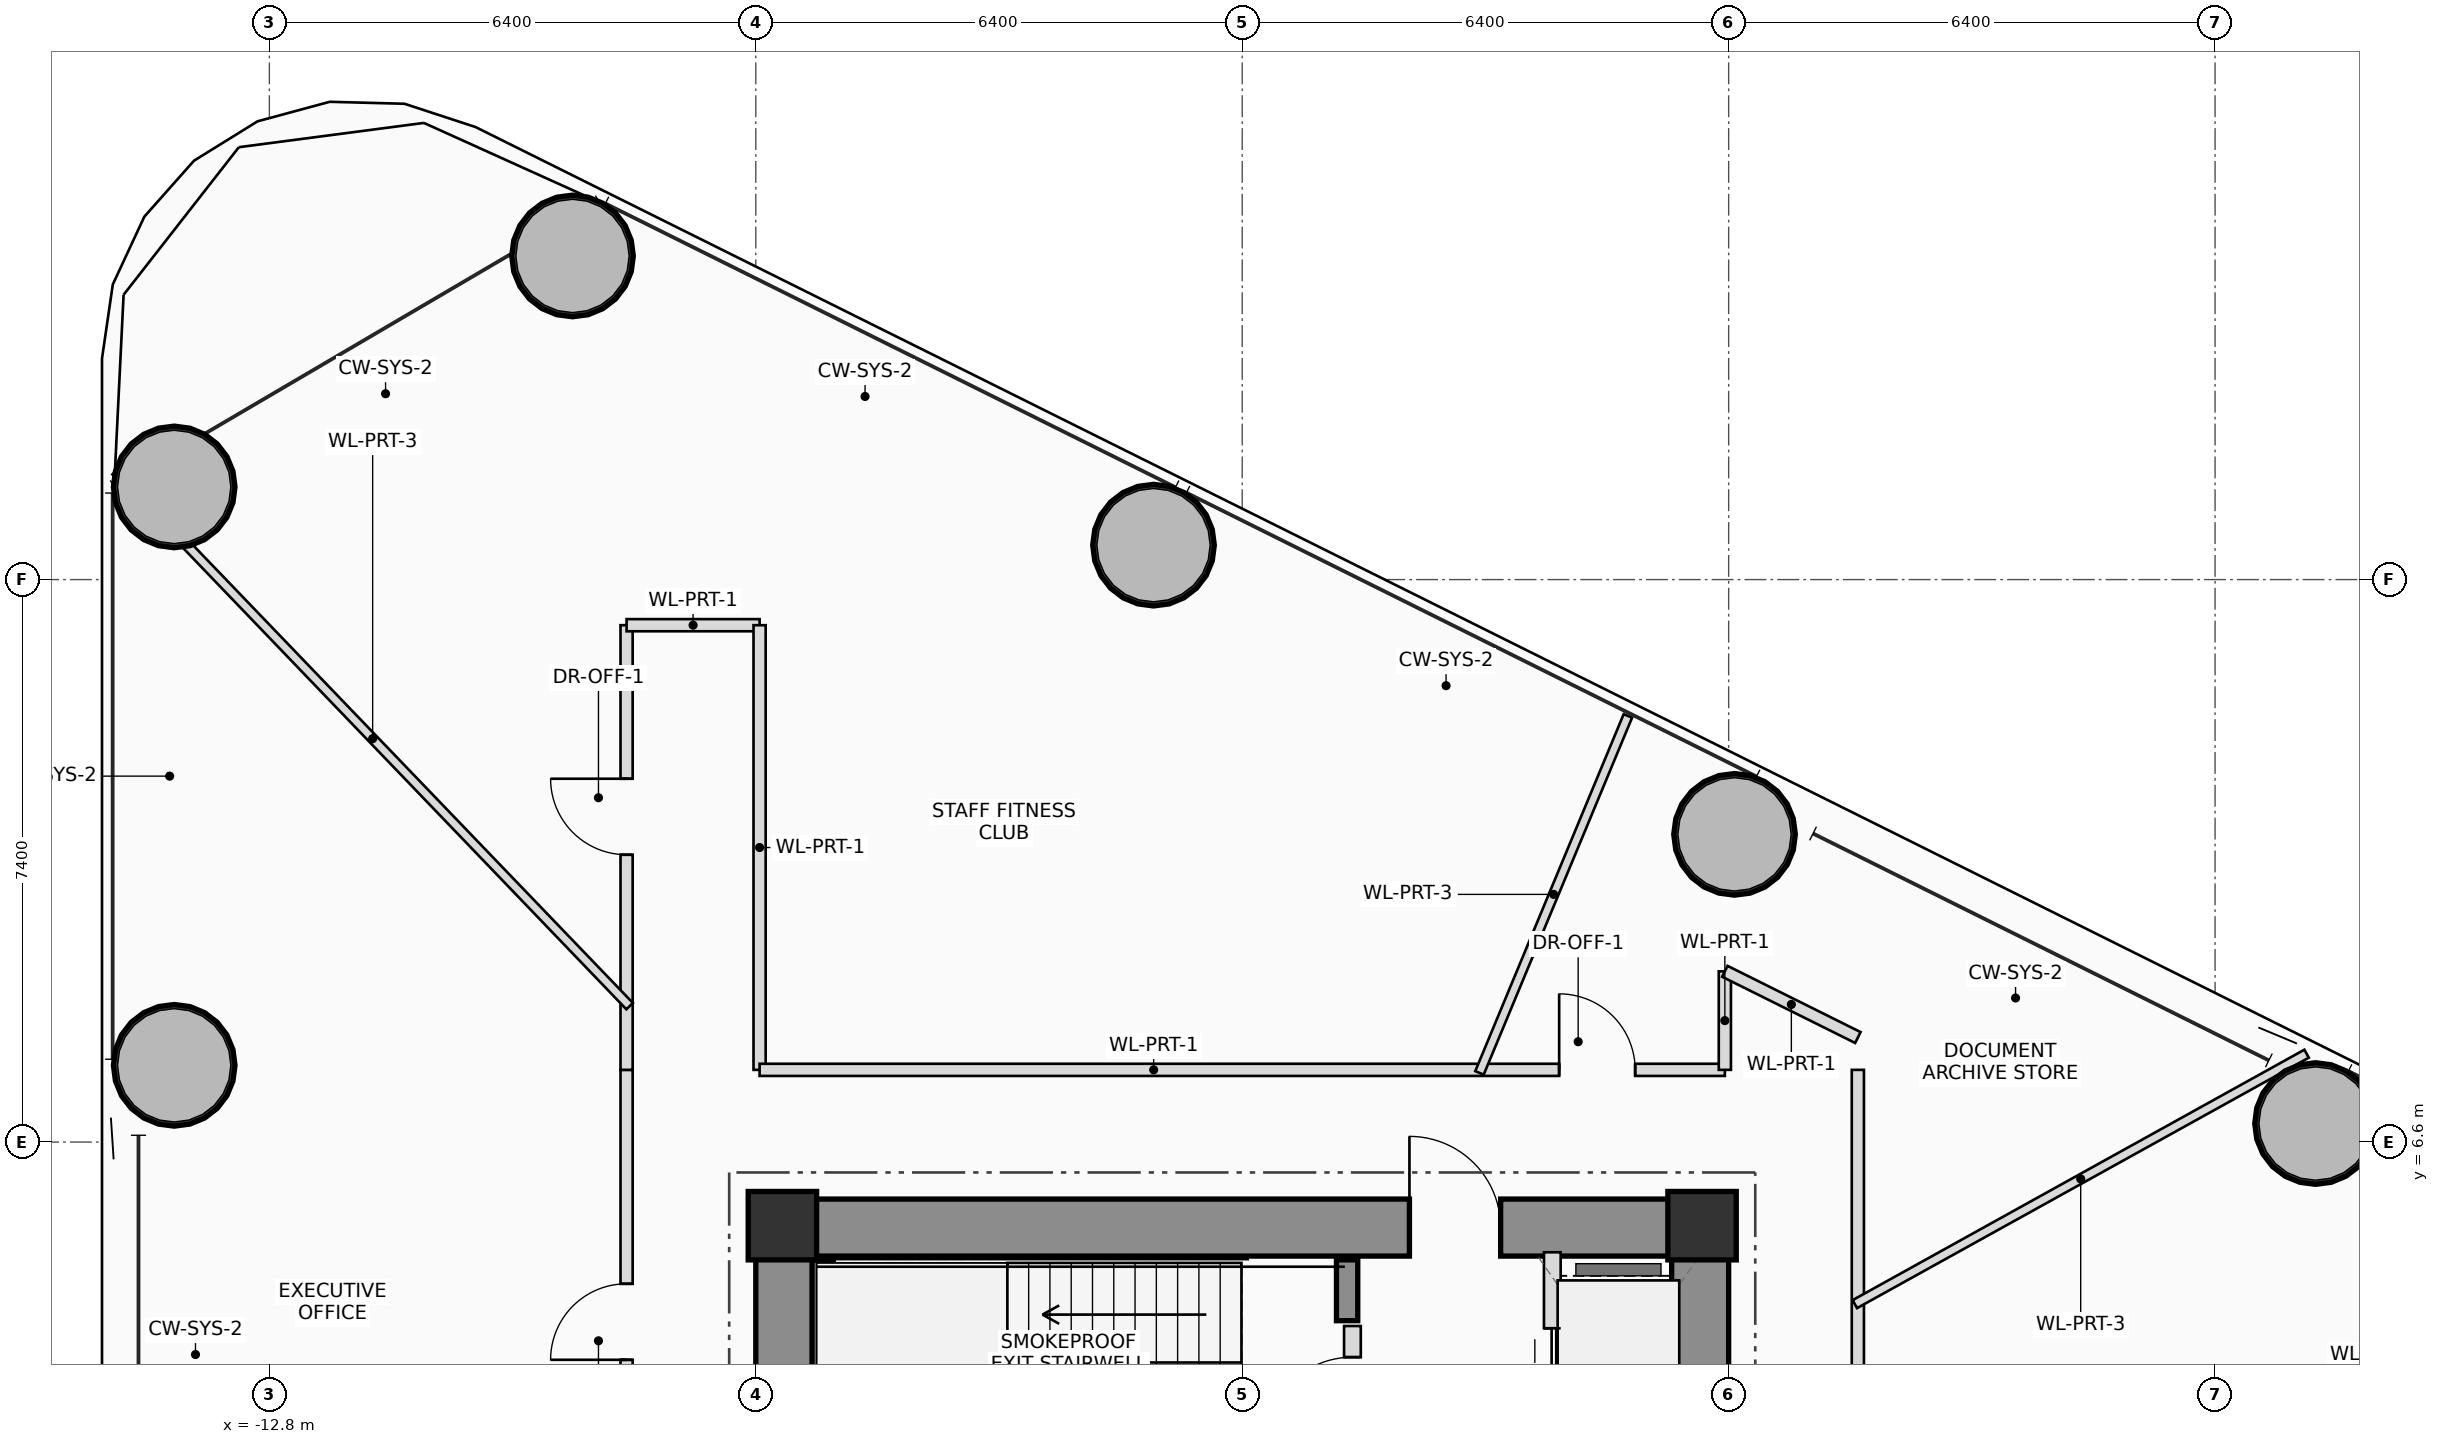
"""IFC4 building model, lengths in metres.
Left out: names, types, materials, properties, quantities, classifications, styles, units other than length and angle.
Written with IfcOpenShell. Run it as: python <this file> out.ifc"""

import sys

from ifc_helpers import new_model, si_unit, direction, frame, frame_2d, origin, origin_2d, place, context, subcontext, project, spatial, rectangle, hollow_circle, extrude, source, transform, mapped, element, fill, save


model = new_model("IFC4")
c1 = context("Model", 3, precision=1e-05, world=origin(), true_north=direction((0.0, 1.0)))
c2 = subcontext(c1, "Body", "Model", "MODEL_VIEW")
j1 = project(units=[si_unit("LENGTHUNIT", "METRE"), si_unit("PLANEANGLEUNIT", "RADIAN")], contexts=[c1])
p1 = place(None, origin())
s1 = spatial("IfcSite", under=j1, at=p1, CompositionType="ELEMENT")
p2 = place(p1, origin())
s2 = spatial("IfcBuilding", under=s1, at=p2, CompositionType="ELEMENT")
p3 = place(p2, frame((0.0, 0.0, 31.2)))
s3 = spatial("IfcBuildingStorey", under=s2, at=p3, CompositionType="ELEMENT", Elevation=31.2)
m1 = source(origin(), c2, "Body", "SweptSolid", [
    extrude(rectangle(XDim=0.9, YDim=0.9, at=origin_2d()), origin(), (0.0, 0.0, 1.0), 3.7),
])
for number, where, z_axis, x_axis in (
    (1, (6.05, 5.5, 0.0), (0.0, 0.0, 1.0), (1.0, 0.0, 0.0)),
    (2, (-6.05, 5.5, 0.0), (0.0, 0.0, 1.0), (1.0, 0.0, 0.0)),
):
    element("IfcColumn", number, at=place(p3, frame(where, z_axis=z_axis, x_axis=x_axis)), inside=s3, PredefinedType="COLUMN", context=c2, shape_type="MappedRepresentation", body=[
        mapped(m1, transform((0.0, 0.0, 0.0), scale=1.0)),
    ])
p4 = place(p3, frame((-6.4, 5.475, 0.0), z_axis=(0.0, 0.0, 1.0), x_axis=(1.0, 0.0, 0.0)))
e3 = element("IfcWall", 3, at=p4, inside=s3, PredefinedType="SHEAR", context=c2, shape_type="SweptSolid", body=[
    extrude(rectangle(XDim=12.8, YDim=0.75, at=frame_2d((6.4, 0.0))), origin(), (0.0, 0.0, 1.0), 3.7),
])
p5 = place(p4, frame((8.6, 0.0, 0.0)))
e4 = element("IfcOpeningElement", 4, at=p5, cuts=e3, PredefinedType="OPENING", context=c2, shape_type="SweptSolid", body=[
    extrude(rectangle(XDim=1.2, YDim=2.2, at=frame_2d((0.6, 1.1))), frame((0.0, 0.385, 0.0), z_axis=(0.0, -1.0, 0.0), x_axis=(1.0, 0.0, 0.0)), (0.0, 0.0, 1.0), 0.77),
])
p6 = place(p3, frame((6.025, -5.1, 0.0), z_axis=(0.0, 0.0, 1.0), x_axis=(0.0, 1.0, 0.0)))
e5 = element("IfcWall", 5, at=p6, inside=s3, PredefinedType="SHEAR", context=c2, shape_type="SweptSolid", body=[
    extrude(rectangle(XDim=10.2, YDim=0.75, at=frame_2d((5.1, 0.0))), origin(), (0.0, 0.0, 1.0), 3.7),
])
p7 = place(p3, frame((-6.025, 1.75, 0.0), z_axis=(0.0, 0.0, 1.0), x_axis=(0.0, 1.0, 0.0)))
e6 = element("IfcWall", 6, at=p7, inside=s3, PredefinedType="SHEAR", context=c2, shape_type="SweptSolid", body=[
    extrude(rectangle(XDim=3.35, YDim=0.75, at=frame_2d((1.675, 0.0))), origin(), (0.0, 0.0, 1.0), 3.7),
])
p8 = place(p3, frame((-5.52, 2.3, 0.0), z_axis=(0.0, 0.0, 1.0), x_axis=(0.0, 1.0, 0.0)))
e7 = element("IfcWall", 7, at=p8, inside=s3, PredefinedType="SHEAR", context=c2, shape_type="SweptSolid", body=[
    extrude(rectangle(XDim=2.75, YDim=0.28, at=frame_2d((1.375, 0.0))), origin(), (0.0, 0.0, 1.0), 3.7),
])
p9 = place(p3, frame((1.38, 4.25, 0.0), z_axis=(0.0, 0.0, 1.0), x_axis=(0.0, 1.0, 0.0)))
e8 = element("IfcWall", 8, at=p9, inside=s3, PredefinedType="SHEAR", context=c2, shape_type="SweptSolid", body=[
    extrude(rectangle(XDim=0.8, YDim=0.28, at=frame_2d((0.4, 0.0))), origin(), (0.0, 0.0, 1.0), 3.7),
])
m2 = source(origin(), c2, "Body", "SweptSolid", [
    extrude(hollow_circle(Radius=0.8, WallThickness=0.055, at=origin_2d()), origin(), (0.0, 0.0, 1.0), 3.7),
])
for number, where, z_axis, x_axis in (
    (9, (14.122, 6.844, 0.0), (0.0, 0.0, 1.0), (1.0, 0.0, 0.0)),
    (10, (6.477, 10.648, 0.0), (0.0, 0.0, 1.0), (1.0, 0.0, 0.0)),
    (11, (-1.167, 14.453, 0.0), (0.0, 0.0, 1.0), (1.0, 0.0, 0.0)),
    (12, (-8.812, 18.258, 0.0), (0.0, 0.0, 1.0), (1.0, 0.0, 0.0)),
    (13, (-14.052, 15.219, 0.0), (0.0, 0.0, 1.0), (1.0, 0.0, 0.0)),
    (14, (-14.052, 7.61, 0.0), (0.0, 0.0, 1.0), (1.0, 0.0, 0.0)),
):
    element("IfcColumn", number, at=place(p3, frame(where, z_axis=z_axis, x_axis=x_axis)), inside=s3, PredefinedType="COLUMN", context=c2, shape_type="MappedRepresentation", body=[
        mapped(m2, transform((0.0, 0.0, 0.0), scale=1.0)),
    ])
p10 = place(p3, frame((1.45, 2.2, 0.0), z_axis=(0.0, 0.0, 1.0), x_axis=(0.0, 1.0, 0.0)))
e15 = element("IfcWall", 15, at=p10, inside=s3, PredefinedType="PLUMBINGWALL", context=c2, shape_type="SweptSolid", body=[
    extrude(rectangle(XDim=1.98, YDim=0.22, at=frame_2d((0.99, 0.0))), origin(), (0.0, 0.0, 1.0), 3.495),
])
p11 = place(p10, frame((0.42, 0.0, 0.0)))
e16 = element("IfcOpeningElement", 16, at=p11, cuts=e15, PredefinedType="OPENING", context=c2, shape_type="SweptSolid", body=[
    extrude(rectangle(XDim=1.15, YDim=2.15, at=frame_2d((0.575, 1.075))), frame((0.0, 0.12, 0.0), z_axis=(0.0, -1.0, 0.0), x_axis=(1.0, 0.0, 0.0)), (0.0, 0.0, 1.0), 0.24),
])
p12 = place(p3, frame((4.08, 2.2, 0.0), z_axis=(0.0, 0.0, 1.0), x_axis=(0.0, 1.0, 0.0)))
e17 = element("IfcWall", 17, at=p12, inside=s3, PredefinedType="PLUMBINGWALL", context=c2, shape_type="SweptSolid", body=[
    extrude(rectangle(XDim=2.95, YDim=0.22, at=frame_2d((1.475, 0.0))), origin(), (0.0, 0.0, 1.0), 3.495),
])
p13 = place(p12, frame((0.75, 0.0, 0.0)))
e18 = element("IfcOpeningElement", 18, at=p13, cuts=e17, PredefinedType="OPENING", context=c2, shape_type="SweptSolid", body=[
    extrude(rectangle(XDim=1.2, YDim=2.25, at=frame_2d((0.6, 1.125))), frame((0.0, 0.12, 0.0), z_axis=(0.0, -1.0, 0.0), x_axis=(1.0, 0.0, 0.0)), (0.0, 0.0, 1.0), 0.24),
])
p14 = place(p3, frame((-8.1, -7.55, 0.0), z_axis=(0.0, 0.0, 1.0), x_axis=(0.0, 1.0, 0.0)))
e19 = element("IfcWall", 19, at=p14, inside=s3, PredefinedType="PARTITIONING", context=c2, shape_type="SweptSolid", body=[
    extrude(rectangle(XDim=15.1, YDim=0.16, at=frame_2d((7.55, 0.0))), origin(), (0.0, 0.0, 1.0), 2.8),
])
p15 = place(p14, frame((11.285, 0.0, 0.0)))
e20 = element("IfcOpeningElement", 20, at=p15, cuts=e19, PredefinedType="OPENING", context=c2, shape_type="SweptSolid", body=[
    extrude(rectangle(XDim=1.0, YDim=2.25, at=frame_2d((0.5, 1.125))), frame((0.0, 0.09, 0.0), z_axis=(0.0, -1.0, 0.0), x_axis=(1.0, 0.0, 0.0)), (0.0, 0.0, 1.0), 0.18),
])
p16 = place(p3, frame((-8.1, 7.55, 0.0), z_axis=(0.0, 0.0, 1.0), x_axis=(0.0, 1.0, 0.0)))
e21 = element("IfcWall", 21, at=p16, inside=s3, PredefinedType="PARTITIONING", context=c2, shape_type="SweptSolid", body=[
    extrude(rectangle(XDim=5.85, YDim=0.16, at=frame_2d((2.925, 0.0))), origin(), (0.0, 0.0, 1.0), 2.8),
])
p17 = place(p16, frame((2.83, 0.0, 0.0)))
e22 = element("IfcOpeningElement", 22, at=p17, cuts=e21, PredefinedType="OPENING", context=c2, shape_type="SweptSolid", body=[
    extrude(rectangle(XDim=1.0, YDim=2.25, at=frame_2d((0.5, 1.125))), frame((0.0, 0.09, 0.0), z_axis=(0.0, -1.0, 0.0), x_axis=(1.0, 0.0, 0.0)), (0.0, 0.0, 1.0), 0.18),
])
p18 = place(p3, frame((-8.1, 13.4, 0.0), z_axis=(0.0, 0.0, 1.0), x_axis=(1.0, 0.0, 0.0)))
e23 = element("IfcWall", 23, at=p18, inside=s3, PredefinedType="PARTITIONING", context=c2, shape_type="SweptSolid", body=[
    extrude(rectangle(XDim=1.75, YDim=0.16, at=frame_2d((0.875, 0.0))), origin(), (0.0, 0.0, 1.0), 2.8),
])
p19 = place(p3, frame((-6.35, 13.4, 0.0), z_axis=(0.0, 0.0, 1.0), x_axis=(0.0, -1.0, 0.0)))
e24 = element("IfcWall", 24, at=p19, inside=s3, PredefinedType="PARTITIONING", context=c2, shape_type="SweptSolid", body=[
    extrude(rectangle(XDim=5.85, YDim=0.16, at=frame_2d((2.925, 0.0))), origin(), (0.0, 0.0, 1.0), 2.8),
])
p20 = place(p3, frame((-6.35, 7.55, 0.0), z_axis=(0.0, 0.0, 1.0), x_axis=(1.0, 0.0, 0.0)))
e25 = element("IfcWall", 25, at=p20, inside=s3, PredefinedType="PARTITIONING", context=c2, shape_type="SweptSolid", body=[
    extrude(rectangle(XDim=12.7, YDim=0.16, at=frame_2d((6.35, 0.0))), origin(), (0.0, 0.0, 1.0), 2.8),
])
p21 = place(p20, frame((10.52, 0.0, 0.0)))
e26 = element("IfcOpeningElement", 26, at=p21, cuts=e25, PredefinedType="OPENING", context=c2, shape_type="SweptSolid", body=[
    extrude(rectangle(XDim=1.0, YDim=2.25, at=frame_2d((0.5, 1.125))), frame((0.0, 0.09, 0.0), z_axis=(0.0, -1.0, 0.0), x_axis=(1.0, 0.0, 0.0)), (0.0, 0.0, 1.0), 0.18),
])
p22 = place(p3, frame((6.35, 7.55, 0.0), z_axis=(0.0, 0.0, 1.0), x_axis=(0.0, 1.0, 0.0)))
e27 = element("IfcWall", 27, at=p22, inside=s3, PredefinedType="PARTITIONING", context=c2, shape_type="SweptSolid", body=[
    extrude(rectangle(XDim=1.296, YDim=0.16, at=frame_2d((0.648, 0.0))), origin(), (0.0, 0.0, 1.0), 2.8),
])
p23 = place(p3, frame((6.35, 8.846, 0.0), z_axis=(0.0, 0.0, 1.0), x_axis=(0.89527489017, -0.445514164793, 0.0)))
e28 = element("IfcWall", 28, at=p23, inside=s3, PredefinedType="PARTITIONING", context=c2, shape_type="SweptSolid", body=[
    extrude(rectangle(XDim=1.955, YDim=0.16, at=frame_2d((0.977, 0.0))), origin(), (0.0, 0.0, 1.0), 2.8),
])
p24 = place(p3, frame((8.1, 7.55, 0.0), z_axis=(0.0, 0.0, 1.0), x_axis=(0.0, -1.0, 0.0)))
e29 = element("IfcWall", 29, at=p24, inside=s3, PredefinedType="PARTITIONING", context=c2, shape_type="SweptSolid", body=[
    extrude(rectangle(XDim=7.53, YDim=0.16, at=frame_2d((3.765, 0.0))), origin(), (0.0, 0.0, 1.0), 2.8),
])
p25 = place(p24, frame((4.681, 0.0, 0.0)))
e30 = element("IfcOpeningElement", 30, at=p25, cuts=e29, PredefinedType="OPENING", context=c2, shape_type="SweptSolid", body=[
    extrude(rectangle(XDim=1.0, YDim=2.25, at=frame_2d((0.5, 1.125))), frame((0.0, 0.09, 0.0), z_axis=(0.0, -1.0, 0.0), x_axis=(1.0, 0.0, 0.0)), (0.0, 0.0, 1.0), 0.18),
])
p26 = place(p3, frame((8.06, 4.468, 0.0), z_axis=(0.0, 0.0, 1.0), x_axis=(0.874622878111, 0.484803899618, 0.0)))
e31 = element("IfcWall", 31, at=p26, inside=s3, PredefinedType="PARTITIONING", context=c2, shape_type="SweptSolid", body=[
    extrude(rectangle(XDim=6.796, YDim=0.12, at=frame_2d((3.398, 0.0))), origin(), (0.0, 0.0, 1.0), 2.8),
])
p27 = place(p3, frame((3.122, 7.51, 0.0), z_axis=(0.0, 0.0, 1.0), x_axis=(0.383885926118, 0.923380525963, 0.0)))
e32 = element("IfcWall", 32, at=p27, inside=s3, PredefinedType="PARTITIONING", context=c2, shape_type="SweptSolid", body=[
    extrude(rectangle(XDim=5.086, YDim=0.12, at=frame_2d((2.543, 0.0))), origin(), (0.0, 0.0, 1.0), 2.96),
])
p28 = place(p3, frame((-8.06, 8.388, 0.0), z_axis=(0.0, 0.0, 1.0), x_axis=(-0.692869708489, 0.721062803823, 0.0)))
e33 = element("IfcWall", 33, at=p28, inside=s3, PredefinedType="PARTITIONING", context=c2, shape_type="SweptSolid", body=[
    extrude(rectangle(XDim=9.759, YDim=0.12, at=frame_2d((4.88, 0.0))), origin(), (0.0, 0.0, 1.0), 2.8),
])
p29 = place(p5, origin())
e34 = element("IfcDoor", 34, at=p29, inside=s3, OperationType="SINGLE_SWING_LEFT", PredefinedType="DOOR", context=c2, shape_type="SweptSolid", body=[
    extrude(rectangle(XDim=1.2, YDim=2.2, at=frame_2d((0.6, 1.1))), frame((0.0, 0.025, 0.0), z_axis=(0.0, -1.0, 0.0), x_axis=(1.0, 0.0, 0.0)), (0.0, 0.0, 1.0), 0.05),
])
fill(e4, e34)
p30 = place(p11, origin())
e35 = element("IfcDoor", 35, at=p30, inside=s3, OperationType="SINGLE_SWING_LEFT", PredefinedType="DOOR", context=c2, shape_type="SweptSolid", body=[
    extrude(rectangle(XDim=1.15, YDim=2.15, at=frame_2d((0.575, 1.075))), frame((0.0, 0.025, 0.0), z_axis=(0.0, -1.0, 0.0), x_axis=(1.0, 0.0, 0.0)), (0.0, 0.0, 1.0), 0.05),
])
fill(e16, e35)
p31 = place(p13, origin())
e36 = element("IfcDoor", 36, at=p31, inside=s3, OperationType="DOUBLE_DOOR_SLIDING", PredefinedType="DOOR", context=c2, shape_type="SweptSolid", body=[
    extrude(rectangle(XDim=1.2, YDim=2.25, at=frame_2d((0.6, 1.125))), frame((0.0, 0.025, 0.0), z_axis=(0.0, -1.0, 0.0), x_axis=(1.0, 0.0, 0.0)), (0.0, 0.0, 1.0), 0.05),
])
fill(e18, e36)
p32 = place(p15, origin())
e37 = element("IfcDoor", 37, at=p32, inside=s3, OperationType="SINGLE_SWING_LEFT", PredefinedType="DOOR", context=c2, shape_type="SweptSolid", body=[
    extrude(rectangle(XDim=1.0, YDim=2.25, at=frame_2d((0.5, 1.125))), frame((0.0, 0.025, 0.0), z_axis=(0.0, -1.0, 0.0), x_axis=(1.0, 0.0, 0.0)), (0.0, 0.0, 1.0), 0.05),
])
fill(e20, e37)
p33 = place(p17, origin())
e38 = element("IfcDoor", 38, at=p33, inside=s3, OperationType="SINGLE_SWING_RIGHT", PredefinedType="DOOR", context=c2, shape_type="SweptSolid", body=[
    extrude(rectangle(XDim=1.0, YDim=2.25, at=frame_2d((0.5, 1.125))), frame((0.0, 0.025, 0.0), z_axis=(0.0, -1.0, 0.0), x_axis=(1.0, 0.0, 0.0)), (0.0, 0.0, 1.0), 0.05),
])
fill(e22, e38)
p34 = place(p21, origin())
e39 = element("IfcDoor", 39, at=p34, inside=s3, OperationType="SINGLE_SWING_LEFT", PredefinedType="DOOR", context=c2, shape_type="SweptSolid", body=[
    extrude(rectangle(XDim=1.0, YDim=2.25, at=frame_2d((0.5, 1.125))), frame((0.0, 0.025, 0.0), z_axis=(0.0, -1.0, 0.0), x_axis=(1.0, 0.0, 0.0)), (0.0, 0.0, 1.0), 0.05),
])
fill(e26, e39)
save(model, sys.argv[1])
